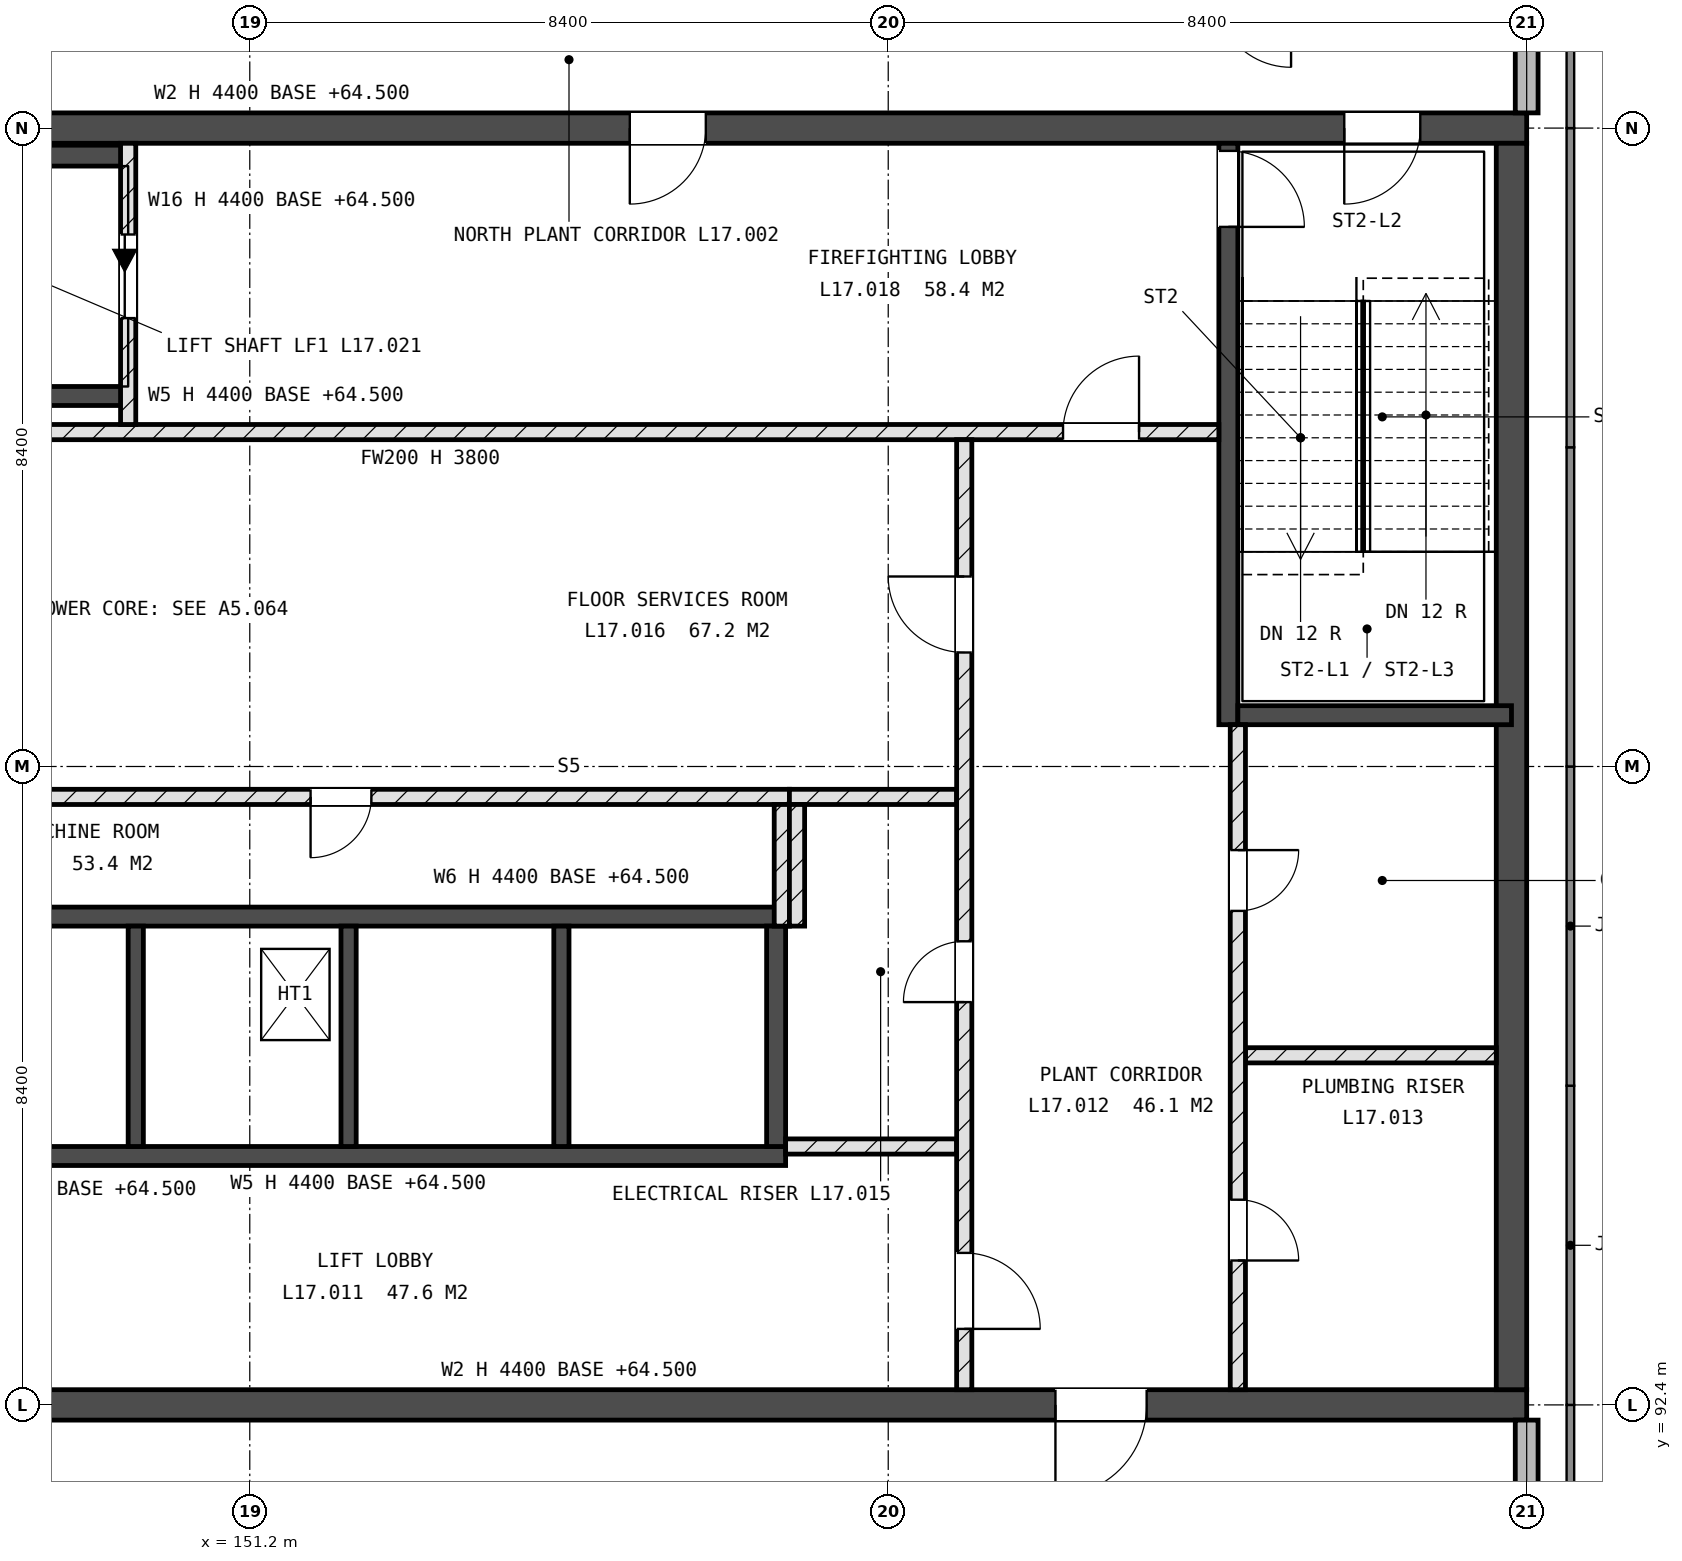
"""IFC4 building model, lengths in metres.
Left out: names, types, materials, properties, quantities, classifications, styles, units other than length and angle.
Written with IfcOpenShell. Run it as: python <this file> out.ifc"""

import sys

from ifc_helpers import new_model, si_unit, direction, frame, frame_2d, origin, origin_2d, place, context, subcontext, project, spatial, rectangle, extrude, element, fill, save


model = new_model("IFC4")
c1 = context("Model", 3, precision=1e-05, world=origin(), true_north=direction((0.0, 1.0)))
c2 = subcontext(c1, "Body", "Model", "MODEL_VIEW")
j1 = project(units=[si_unit("LENGTHUNIT", "METRE"), si_unit("PLANEANGLEUNIT", "RADIAN")], contexts=[c1])
p1 = place(None, origin())
s1 = spatial("IfcSite", under=j1, at=p1, CompositionType="ELEMENT")
p2 = place(p1, origin())
s2 = spatial("IfcBuilding", under=s1, at=p2, CompositionType="ELEMENT")
p3 = place(p2, frame((0.0, 0.0, 64.8)))
s3 = spatial("IfcBuildingStorey", under=s2, at=p3, CompositionType="ELEMENT", Elevation=64.8)
p4 = place(p3, frame((142.8, 92.4, -0.3), z_axis=(0.0, 0.0, 1.0), x_axis=(1.0, 0.0, 0.0)))
e1 = element("IfcWall", 1, at=p4, inside=s3, PredefinedType="SHEAR", context=c2, shape_type="SweptSolid", body=[
    extrude(rectangle(XDim=25.2, YDim=0.4, at=frame_2d((12.6, 0.0))), origin(), (0.0, 0.0, 1.0), 4.4),
])
p5 = place(p4, frame((19.0, 0.0, 0.3)))
e2 = element("IfcOpeningElement", 2, at=p5, cuts=e1, PredefinedType="OPENING", context=c2, shape_type="SweptSolid", body=[
    extrude(rectangle(XDim=1.2, YDim=2.4, at=frame_2d((0.6, 1.2))), frame((0.0, 0.21, 0.0), z_axis=(0.0, -1.0, 0.0), x_axis=(1.0, 0.0, 0.0)), (0.0, 0.0, 1.0), 0.42),
])
p6 = place(p3, frame((142.8, 109.2, -0.3), z_axis=(0.0, 0.0, 1.0), x_axis=(1.0, 0.0, 0.0)))
e3 = element("IfcWall", 3, at=p6, inside=s3, PredefinedType="SHEAR", context=c2, shape_type="SweptSolid", body=[
    extrude(rectangle(XDim=25.2, YDim=0.4, at=frame_2d((12.6, 0.0))), origin(), (0.0, 0.0, 1.0), 4.4),
])
p7 = place(p6, frame((22.8, 0.0, 0.3)))
e4 = element("IfcOpeningElement", 4, at=p7, cuts=e3, PredefinedType="OPENING", context=c2, shape_type="SweptSolid", body=[
    extrude(rectangle(XDim=1.0, YDim=2.1, at=frame_2d((0.5, 1.05))), frame((0.0, 0.21, 0.0), z_axis=(0.0, -1.0, 0.0), x_axis=(1.0, 0.0, 0.0)), (0.0, 0.0, 1.0), 0.42),
])
p8 = place(p6, frame((1.5, 0.0, 0.3)))
e5 = element("IfcOpeningElement", 5, at=p8, cuts=e3, PredefinedType="OPENING", context=c2, shape_type="SweptSolid", body=[
    extrude(rectangle(XDim=0.8, YDim=2.1, at=frame_2d((0.4, 1.05))), frame((0.0, 0.21, 0.0), z_axis=(0.0, -1.0, 0.0), x_axis=(1.0, 0.0, 0.0)), (0.0, 0.0, 1.0), 0.42),
])
p9 = place(p6, frame((13.4, 0.0, 0.3)))
e6 = element("IfcOpeningElement", 6, at=p9, cuts=e3, PredefinedType="OPENING", context=c2, shape_type="SweptSolid", body=[
    extrude(rectangle(XDim=1.0, YDim=2.1, at=frame_2d((0.5, 1.05))), frame((0.0, 0.21, 0.0), z_axis=(0.0, -1.0, 0.0), x_axis=(1.0, 0.0, 0.0)), (0.0, 0.0, 1.0), 0.42),
])
p10 = place(p3, frame((167.8, 92.6, -0.3), z_axis=(0.0, 0.0, 1.0), x_axis=(0.0, 1.0, 0.0)))
e7 = element("IfcWall", 7, at=p10, inside=s3, PredefinedType="SHEAR", context=c2, shape_type="SweptSolid", body=[
    extrude(rectangle(XDim=16.4, YDim=0.4, at=frame_2d((8.2, 0.0))), origin(), (0.0, 0.0, 1.0), 4.4),
])
p11 = place(p3, frame((164.075, 101.35, -0.3), z_axis=(0.0, 0.0, 1.0), x_axis=(0.0, 1.0, 0.0)))
e8 = element("IfcWall", 8, at=p11, inside=s3, PredefinedType="SHEAR", context=c2, shape_type="SweptSolid", body=[
    extrude(rectangle(XDim=7.65, YDim=0.25, at=frame_2d((3.825, 0.0))), origin(), (0.0, 0.0, 1.0), 4.4),
])
p12 = place(p11, frame((6.55, 0.0, 0.3)))
e9 = element("IfcOpeningElement", 9, at=p12, cuts=e8, PredefinedType="OPENING", context=c2, shape_type="SweptSolid", body=[
    extrude(rectangle(XDim=1.0, YDim=2.1, at=frame_2d((0.5, 1.05))), frame((0.0, 0.135, 0.0), z_axis=(0.0, -1.0, 0.0), x_axis=(1.0, 0.0, 0.0)), (0.0, 0.0, 1.0), 0.27),
])
p13 = place(p3, frame((164.2, 101.475, -0.3), z_axis=(0.0, 0.0, 1.0), x_axis=(1.0, 0.0, 0.0)))
e10 = element("IfcWall", 10, at=p13, inside=s3, PredefinedType="SHEAR", context=c2, shape_type="SweptSolid", body=[
    extrude(rectangle(XDim=3.6, YDim=0.25, at=frame_2d((1.8, 0.0))), origin(), (0.0, 0.0, 1.0), 4.4),
])
for number, where, z_axis, x_axis in (
    (11, (147.0, 95.675, -0.3), (0.0, 0.0, 1.0), (1.0, 0.0, 0.0)),
    (12, (147.0, 98.825, -0.3), (0.0, 0.0, 1.0), (1.0, 0.0, 0.0)),
):
    element("IfcWall", number, at=place(p3, frame(where, z_axis=z_axis, x_axis=x_axis)), inside=s3, PredefinedType="SHEAR", context=c2, shape_type="SweptSolid", body=[
        extrude(rectangle(XDim=11.25, YDim=0.25, at=frame_2d((5.625, 0.0))), origin(), (0.0, 0.0, 1.0), 4.4),
    ])
p14 = place(p3, frame((158.125, 95.8, -0.3), z_axis=(0.0, 0.0, 1.0), x_axis=(0.0, 1.0, 0.0)))
e13 = element("IfcWall", 13, at=p14, inside=s3, PredefinedType="SHEAR", context=c2, shape_type="SweptSolid", body=[
    extrude(rectangle(XDim=2.9, YDim=0.25, at=frame_2d((1.45, 0.0))), origin(), (0.0, 0.0, 1.0), 4.4),
])
for number, where, z_axis, x_axis in (
    (14, (149.7, 95.8, -0.3), (0.0, 0.0, 1.0), (0.0, 1.0, 0.0)),
    (15, (152.5, 95.8, -0.3), (0.0, 0.0, 1.0), (0.0, 1.0, 0.0)),
    (16, (155.3, 95.8, -0.3), (0.0, 0.0, 1.0), (0.0, 1.0, 0.0)),
):
    element("IfcWall", number, at=place(p3, frame(where, z_axis=z_axis, x_axis=x_axis)), inside=s3, PredefinedType="SHEAR", context=c2, shape_type="SweptSolid", body=[
        extrude(rectangle(XDim=2.9, YDim=0.2, at=frame_2d((1.45, 0.0))), origin(), (0.0, 0.0, 1.0), 4.4),
    ])
p15 = place(p3, frame((146.75, 105.675, -0.3), z_axis=(0.0, 0.0, 1.0), x_axis=(1.0, 0.0, 0.0)))
e17 = element("IfcWall", 17, at=p15, inside=s3, PredefinedType="SHEAR", context=c2, shape_type="SweptSolid", body=[
    extrude(rectangle(XDim=2.85, YDim=0.25, at=frame_2d((1.425, 0.0))), origin(), (0.0, 0.0, 1.0), 4.4),
])
p16 = place(p3, frame((146.75, 108.837, -0.3), z_axis=(0.0, 0.0, 1.0), x_axis=(1.0, 0.0, 0.0)))
e18 = element("IfcWall", 18, at=p16, inside=s3, PredefinedType="SHEAR", context=c2, shape_type="SweptSolid", body=[
    extrude(rectangle(XDim=2.85, YDim=0.275, at=frame_2d((1.425, 0.0))), origin(), (0.0, 0.0, 1.0), 4.4),
])
p17 = place(p3, frame((168.0, 84.325, 0.0), z_axis=(0.0, 0.0, 1.0), x_axis=(0.0, 1.0, 0.0)))
e19 = element("IfcWall", 19, at=p17, inside=s3, PredefinedType="STANDARD", context=c2, shape_type="SweptSolid", body=[
    extrude(rectangle(XDim=7.875, YDim=0.3, at=frame_2d((3.938, 0.0))), origin(), (0.0, 0.0, 1.0), 3.1),
])
p18 = place(p17, frame((2.438, 0.0, 0.55)))
e20 = element("IfcOpeningElement", 20, at=p18, cuts=e19, PredefinedType="OPENING", context=c2, shape_type="SweptSolid", body=[
    extrude(rectangle(XDim=3.0, YDim=2.4, at=frame_2d((1.5, 1.2))), frame((0.0, 0.16, 0.0), z_axis=(0.0, -1.0, 0.0), x_axis=(1.0, 0.0, 0.0)), (0.0, 0.0, 1.0), 0.32),
])
p19 = place(p3, frame((168.0, 109.4, 0.0), z_axis=(0.0, 0.0, 1.0), x_axis=(0.0, 1.0, 0.0)))
e21 = element("IfcWall", 21, at=p19, inside=s3, PredefinedType="STANDARD", context=c2, shape_type="SweptSolid", body=[
    extrude(rectangle(XDim=7.875, YDim=0.3, at=frame_2d((3.938, 0.0))), origin(), (0.0, 0.0, 1.0), 3.8),
])
p20 = place(p19, frame((4.6, 0.0, 2.1)))
e22 = element("IfcOpeningElement", 22, at=p20, cuts=e21, PredefinedType="OPENING", context=c2, shape_type="SweptSolid", body=[
    extrude(rectangle(XDim=0.9, YDim=0.6, at=frame_2d((0.45, 0.3))), frame((0.0, 0.16, 0.0), z_axis=(0.0, -1.0, 0.0), x_axis=(1.0, 0.0, 0.0)), (0.0, 0.0, 1.0), 0.32),
])
p21 = place(p3, frame((158.25, 95.8, 0.0), z_axis=(0.0, 0.0, 1.0), x_axis=(1.0, 0.0, 0.0)))
e23 = element("IfcWall", 23, at=p21, inside=s3, PredefinedType="SOLIDWALL", context=c2, shape_type="SweptSolid", body=[
    extrude(rectangle(XDim=2.25, YDim=0.2, at=frame_2d((1.125, 0.0))), origin(), (0.0, 0.0, 1.0), 3.8),
])
p22 = place(p3, frame((164.3, 97.0, 0.0), z_axis=(0.0, 0.0, 1.0), x_axis=(1.0, 0.0, 0.0)))
e24 = element("IfcWall", 24, at=p22, inside=s3, PredefinedType="SOLIDWALL", context=c2, shape_type="SweptSolid", body=[
    extrude(rectangle(XDim=3.3, YDim=0.2, at=frame_2d((1.65, 0.0))), origin(), (0.0, 0.0, 1.0), 3.8),
])
p23 = place(p3, frame((146.5, 100.4, 0.0), z_axis=(0.0, 0.0, 1.0), x_axis=(1.0, 0.0, 0.0)))
e25 = element("IfcWall", 25, at=p23, inside=s3, PredefinedType="SOLIDWALL", context=c2, shape_type="SweptSolid", body=[
    extrude(rectangle(XDim=11.8, YDim=0.2, at=frame_2d((5.9, 0.0))), origin(), (0.0, 0.0, 1.0), 3.8),
])
p24 = place(p23, frame((5.5, 0.0, 0.0)))
e26 = element("IfcOpeningElement", 26, at=p24, cuts=e25, PredefinedType="OPENING", context=c2, shape_type="SweptSolid", body=[
    extrude(rectangle(XDim=0.8, YDim=2.1, at=frame_2d((0.4, 1.05))), frame((0.0, 0.11, 0.0), z_axis=(0.0, -1.0, 0.0), x_axis=(1.0, 0.0, 0.0)), (0.0, 0.0, 1.0), 0.22),
])
p25 = place(p3, frame((158.3, 100.4, 0.0), z_axis=(0.0, 0.0, 1.0), x_axis=(1.0, 0.0, 0.0)))
e27 = element("IfcWall", 27, at=p25, inside=s3, PredefinedType="SOLIDWALL", context=c2, shape_type="SweptSolid", body=[
    extrude(rectangle(XDim=2.2, YDim=0.2, at=frame_2d((1.1, 0.0))), origin(), (0.0, 0.0, 1.0), 3.8),
])
p26 = place(p3, frame((143.2, 105.2, 0.0), z_axis=(0.0, 0.0, 1.0), x_axis=(1.0, 0.0, 0.0)))
e28 = element("IfcWall", 28, at=p26, inside=s3, PredefinedType="SOLIDWALL", context=c2, shape_type="SweptSolid", body=[
    extrude(rectangle(XDim=20.75, YDim=0.2, at=frame_2d((10.375, 0.0))), origin(), (0.0, 0.0, 1.0), 3.8),
])
p27 = place(p26, frame((18.7, 0.0, 0.0)))
e29 = element("IfcOpeningElement", 29, at=p27, cuts=e28, PredefinedType="OPENING", context=c2, shape_type="SweptSolid", body=[
    extrude(rectangle(XDim=1.0, YDim=2.1, at=frame_2d((0.5, 1.05))), frame((0.0, 0.11, 0.0), z_axis=(0.0, -1.0, 0.0), x_axis=(1.0, 0.0, 0.0)), (0.0, 0.0, 1.0), 0.22),
])
p28 = place(p3, frame((149.6, 105.3, 0.0), z_axis=(0.0, 0.0, 1.0), x_axis=(0.0, 1.0, 0.0)))
e30 = element("IfcWall", 30, at=p28, inside=s3, PredefinedType="SOLIDWALL", context=c2, shape_type="SweptSolid", body=[
    extrude(rectangle(XDim=3.7, YDim=0.2, at=frame_2d((1.85, 0.0))), origin(), (0.0, 0.0, 1.0), 3.8),
])
p29 = place(p28, frame((1.4, 0.0, 0.0)))
e31 = element("IfcOpeningElement", 31, at=p29, cuts=e30, PredefinedType="OPENING", context=c2, shape_type="SweptSolid", body=[
    extrude(rectangle(XDim=1.1, YDim=2.1, at=frame_2d((0.55, 1.05))), frame((0.0, 0.11, 0.0), z_axis=(0.0, -1.0, 0.0), x_axis=(1.0, 0.0, 0.0)), (0.0, 0.0, 1.0), 0.22),
])
for number, where, z_axis, x_axis in (
    (32, (158.2, 98.7, 0.0), (0.0, 0.0, 1.0), (0.0, 1.0, 0.0)),
    (33, (158.4, 98.7, 0.0), (0.0, 0.0, 1.0), (0.0, 1.0, 0.0)),
):
    element("IfcWall", number, at=place(p3, frame(where, z_axis=z_axis, x_axis=x_axis)), inside=s3, PredefinedType="SOLIDWALL", context=c2, shape_type="SweptSolid", body=[
        extrude(rectangle(XDim=1.6, YDim=0.2, at=frame_2d((0.8, 0.0))), origin(), (0.0, 0.0, 1.0), 3.8),
    ])
p30 = place(p3, frame((160.6, 92.6, 0.0), z_axis=(0.0, 0.0, 1.0), x_axis=(0.0, 1.0, 0.0)))
e34 = element("IfcWall", 34, at=p30, inside=s3, PredefinedType="SOLIDWALL", context=c2, shape_type="SweptSolid", body=[
    extrude(rectangle(XDim=12.5, YDim=0.2, at=frame_2d((6.25, 0.0))), origin(), (0.0, 0.0, 1.0), 3.8),
])
p31 = place(p30, frame((5.1, 0.0, 0.0)))
e35 = element("IfcOpeningElement", 35, at=p31, cuts=e34, PredefinedType="OPENING", context=c2, shape_type="SweptSolid", body=[
    extrude(rectangle(XDim=0.8, YDim=2.1, at=frame_2d((0.4, 1.05))), frame((0.0, 0.11, 0.0), z_axis=(0.0, -1.0, 0.0), x_axis=(1.0, 0.0, 0.0)), (0.0, 0.0, 1.0), 0.22),
])
p32 = place(p30, frame((9.7, 0.0, 0.0)))
e36 = element("IfcOpeningElement", 36, at=p32, cuts=e34, PredefinedType="OPENING", context=c2, shape_type="SweptSolid", body=[
    extrude(rectangle(XDim=1.0, YDim=2.1, at=frame_2d((0.5, 1.05))), frame((0.0, 0.11, 0.0), z_axis=(0.0, -1.0, 0.0), x_axis=(1.0, 0.0, 0.0)), (0.0, 0.0, 1.0), 0.22),
])
p33 = place(p30, frame((0.8, 0.0, 0.0)))
e37 = element("IfcOpeningElement", 37, at=p33, cuts=e34, PredefinedType="OPENING", context=c2, shape_type="SweptSolid", body=[
    extrude(rectangle(XDim=1.0, YDim=2.1, at=frame_2d((0.5, 1.05))), frame((0.0, 0.11, 0.0), z_axis=(0.0, -1.0, 0.0), x_axis=(1.0, 0.0, 0.0)), (0.0, 0.0, 1.0), 0.22),
])
p34 = place(p3, frame((164.2, 92.6, 0.0), z_axis=(0.0, 0.0, 1.0), x_axis=(0.0, 1.0, 0.0)))
e38 = element("IfcWall", 38, at=p34, inside=s3, PredefinedType="SOLIDWALL", context=c2, shape_type="SweptSolid", body=[
    extrude(rectangle(XDim=8.75, YDim=0.2, at=frame_2d((4.375, 0.0))), origin(), (0.0, 0.0, 1.0), 3.8),
])
p35 = place(p34, frame((1.7, 0.0, 0.0)))
e39 = element("IfcOpeningElement", 39, at=p35, cuts=e38, PredefinedType="OPENING", context=c2, shape_type="SweptSolid", body=[
    extrude(rectangle(XDim=0.8, YDim=2.1, at=frame_2d((0.4, 1.05))), frame((0.0, 0.11, 0.0), z_axis=(0.0, -1.0, 0.0), x_axis=(1.0, 0.0, 0.0)), (0.0, 0.0, 1.0), 0.22),
])
p36 = place(p34, frame((6.3, 0.0, 0.0)))
e40 = element("IfcOpeningElement", 40, at=p36, cuts=e38, PredefinedType="OPENING", context=c2, shape_type="SweptSolid", body=[
    extrude(rectangle(XDim=0.8, YDim=2.1, at=frame_2d((0.4, 1.05))), frame((0.0, 0.11, 0.0), z_axis=(0.0, -1.0, 0.0), x_axis=(1.0, 0.0, 0.0)), (0.0, 0.0, 1.0), 0.22),
])
p37 = place(p2, frame((0.0, 0.0, 68.9)))
p38 = place(p37, frame((0.0, 0.0, -0.3)))
p39 = place(p38, frame((151.8, 97.8, 0.0)))
p40 = place(p39, frame((0.0, 0.0, 0.25)))
e41 = element("IfcWindow", 41, at=p40, inside=s3, PartitioningType="SINGLE_PANEL", PredefinedType="SKYLIGHT", context=c2, shape_type="SweptSolid", body=[
    extrude(rectangle(XDim=0.9, YDim=1.2, at=origin_2d()), origin(), (0.0, 0.0, 1.0), 0.05),
])
p41 = place(p29, origin())
e42 = element("IfcDoor", 42, at=p41, inside=s3, OperationType="SLIDING_TO_LEFT", PredefinedType="DOOR", context=c2, shape_type="SweptSolid", body=[
    extrude(rectangle(XDim=1.1, YDim=2.1, at=frame_2d((0.55, 1.05))), frame((0.0, 0.025, 0.0), z_axis=(0.0, -1.0, 0.0), x_axis=(1.0, 0.0, 0.0)), (0.0, 0.0, 1.0), 0.05),
])
fill(e31, e42)
p42 = place(p12, origin())
e43 = element("IfcDoor", 43, at=p42, inside=s3, OperationType="SINGLE_SWING_LEFT", PredefinedType="DOOR", context=c2, shape_type="SweptSolid", body=[
    extrude(rectangle(XDim=1.0, YDim=2.1, at=frame_2d((0.5, 1.05))), frame((0.0, 0.025, 0.0), z_axis=(0.0, -1.0, 0.0), x_axis=(1.0, 0.0, 0.0)), (0.0, 0.0, 1.0), 0.05),
])
fill(e9, e43)
p43 = place(p7, origin())
e44 = element("IfcDoor", 44, at=p43, inside=s3, OperationType="SINGLE_SWING_LEFT", PredefinedType="DOOR", context=c2, shape_type="SweptSolid", body=[
    extrude(rectangle(XDim=1.0, YDim=2.1, at=frame_2d((0.5, 1.05))), frame((0.0, 0.025, 0.0), z_axis=(0.0, -1.0, 0.0), x_axis=(1.0, 0.0, 0.0)), (0.0, 0.0, 1.0), 0.05),
])
fill(e4, e44)
p44 = place(p5, origin())
e45 = element("IfcDoor", 45, at=p44, inside=s3, OperationType="SINGLE_SWING_LEFT", PredefinedType="DOOR", context=c2, shape_type="SweptSolid", body=[
    extrude(rectangle(XDim=1.2, YDim=2.4, at=frame_2d((0.6, 1.2))), frame((0.0, 0.025, 0.0), z_axis=(0.0, -1.0, 0.0), x_axis=(1.0, 0.0, 0.0)), (0.0, 0.0, 1.0), 0.05),
])
fill(e2, e45)
p45 = place(p35, origin())
e46 = element("IfcDoor", 46, at=p45, inside=s3, OperationType="SINGLE_SWING_LEFT", PredefinedType="DOOR", context=c2, shape_type="SweptSolid", body=[
    extrude(rectangle(XDim=0.8, YDim=2.1, at=frame_2d((0.4, 1.05))), frame((0.0, 0.025, 0.0), z_axis=(0.0, -1.0, 0.0), x_axis=(1.0, 0.0, 0.0)), (0.0, 0.0, 1.0), 0.05),
])
fill(e39, e46)
p46 = place(p36, origin())
e47 = element("IfcDoor", 47, at=p46, inside=s3, OperationType="SINGLE_SWING_RIGHT", PredefinedType="DOOR", context=c2, shape_type="SweptSolid", body=[
    extrude(rectangle(XDim=0.8, YDim=2.1, at=frame_2d((0.4, 1.05))), frame((0.0, 0.025, 0.0), z_axis=(0.0, -1.0, 0.0), x_axis=(1.0, 0.0, 0.0)), (0.0, 0.0, 1.0), 0.05),
])
fill(e40, e47)
p47 = place(p31, origin())
e48 = element("IfcDoor", 48, at=p47, inside=s3, OperationType="SINGLE_SWING_RIGHT", PredefinedType="DOOR", context=c2, shape_type="SweptSolid", body=[
    extrude(rectangle(XDim=0.8, YDim=2.1, at=frame_2d((0.4, 1.05))), frame((0.0, 0.025, 0.0), z_axis=(0.0, -1.0, 0.0), x_axis=(1.0, 0.0, 0.0)), (0.0, 0.0, 1.0), 0.05),
])
fill(e35, e48)
p48 = place(p24, origin())
e49 = element("IfcDoor", 49, at=p48, inside=s3, OperationType="SINGLE_SWING_LEFT", PredefinedType="DOOR", context=c2, shape_type="SweptSolid", body=[
    extrude(rectangle(XDim=0.8, YDim=2.1, at=frame_2d((0.4, 1.05))), frame((0.0, 0.025, 0.0), z_axis=(0.0, -1.0, 0.0), x_axis=(1.0, 0.0, 0.0)), (0.0, 0.0, 1.0), 0.05),
])
fill(e26, e49)
p49 = place(p32, origin())
e50 = element("IfcDoor", 50, at=p49, inside=s3, OperationType="SINGLE_SWING_LEFT", PredefinedType="DOOR", context=c2, shape_type="SweptSolid", body=[
    extrude(rectangle(XDim=1.0, YDim=2.1, at=frame_2d((0.5, 1.05))), frame((0.0, 0.025, 0.0), z_axis=(0.0, -1.0, 0.0), x_axis=(1.0, 0.0, 0.0)), (0.0, 0.0, 1.0), 0.05),
])
fill(e36, e50)
p50 = place(p27, origin())
e51 = element("IfcDoor", 51, at=p50, inside=s3, OperationType="SINGLE_SWING_LEFT", PredefinedType="DOOR", context=c2, shape_type="SweptSolid", body=[
    extrude(rectangle(XDim=1.0, YDim=2.1, at=frame_2d((0.5, 1.05))), frame((0.0, 0.025, 0.0), z_axis=(0.0, -1.0, 0.0), x_axis=(1.0, 0.0, 0.0)), (0.0, 0.0, 1.0), 0.05),
])
fill(e29, e51)
p51 = place(p9, origin())
e52 = element("IfcDoor", 52, at=p51, inside=s3, OperationType="SINGLE_SWING_LEFT", PredefinedType="DOOR", context=c2, shape_type="SweptSolid", body=[
    extrude(rectangle(XDim=1.0, YDim=2.1, at=frame_2d((0.5, 1.05))), frame((0.0, 0.025, 0.0), z_axis=(0.0, -1.0, 0.0), x_axis=(1.0, 0.0, 0.0)), (0.0, 0.0, 1.0), 0.05),
])
fill(e6, e52)
p52 = place(p33, origin())
e53 = element("IfcDoor", 53, at=p52, inside=s3, OperationType="SINGLE_SWING_LEFT", PredefinedType="DOOR", context=c2, shape_type="SweptSolid", body=[
    extrude(rectangle(XDim=1.0, YDim=2.1, at=frame_2d((0.5, 1.05))), frame((0.0, 0.025, 0.0), z_axis=(0.0, -1.0, 0.0), x_axis=(1.0, 0.0, 0.0)), (0.0, 0.0, 1.0), 0.05),
])
fill(e37, e53)
save(model, sys.argv[1])
